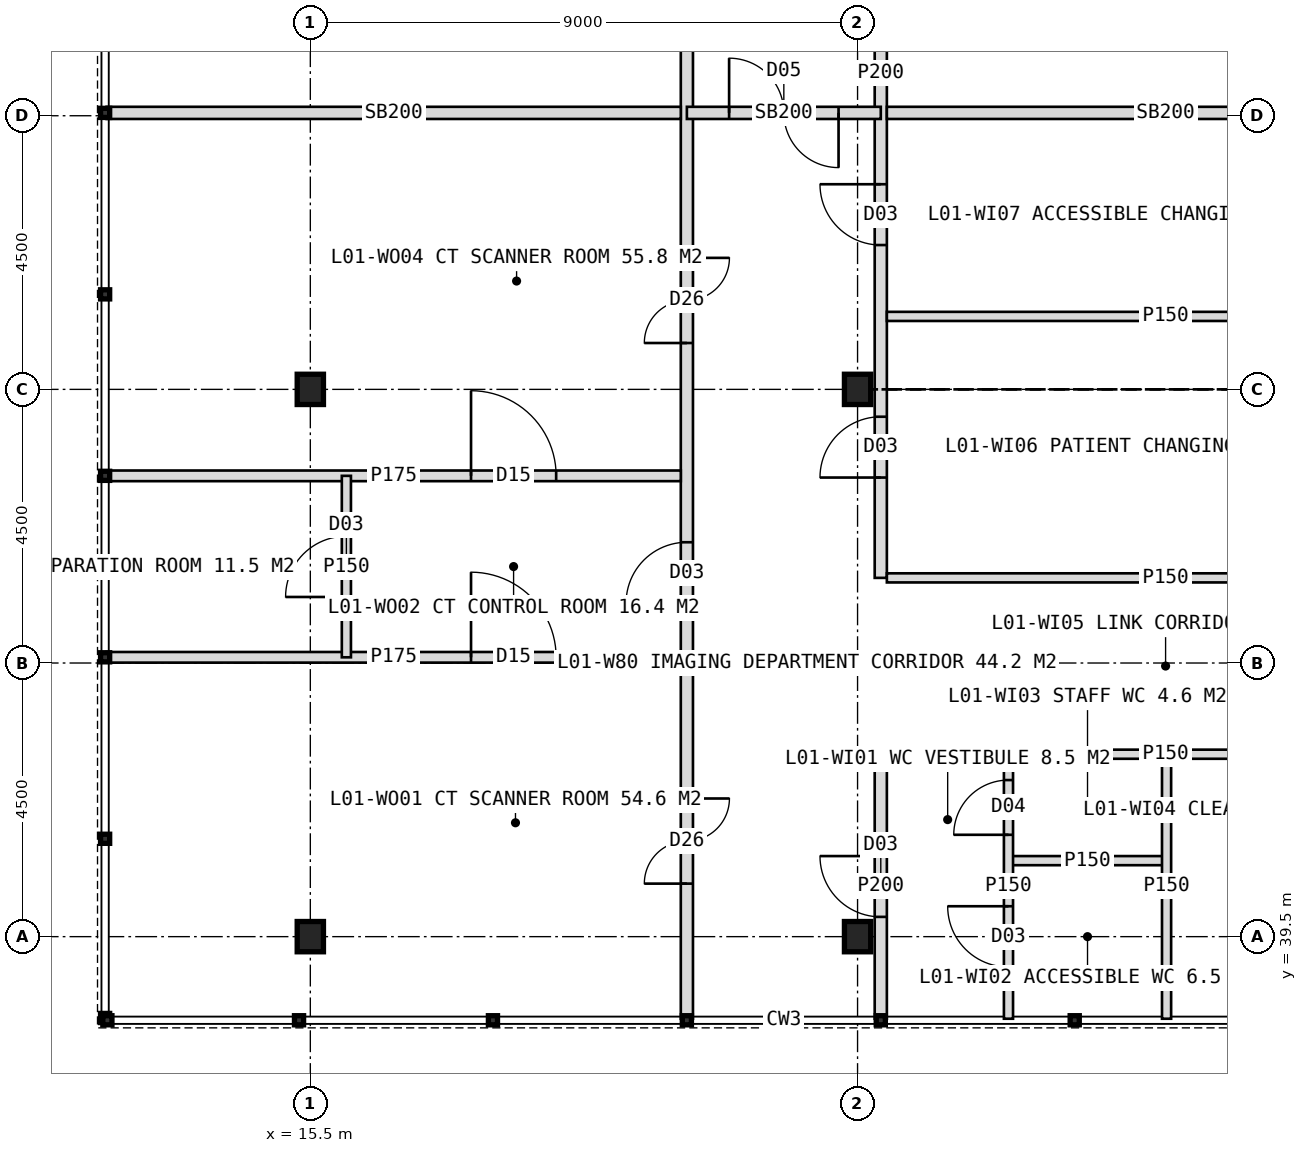
"""IFC4 building model, lengths in metres.
Left out: names, types, materials, properties, quantities, classifications, styles, units other than length and angle.
Written with IfcOpenShell. Run it as: python <this file> out.ifc"""

import sys

from ifc_helpers import new_model, si_unit, direction, frame, frame_2d, origin, origin_2d, place, context, subcontext, project, spatial, rectangle, i_section, extrude, element, fill, save


model = new_model("IFC4")
c1 = context("Model", 3, precision=1e-05, world=origin(), true_north=direction((0.0, 1.0)))
c2 = subcontext(c1, "Body", "Model", "MODEL_VIEW")
j1 = project(units=[si_unit("LENGTHUNIT", "METRE"), si_unit("PLANEANGLEUNIT", "RADIAN")], contexts=[c1])
p1 = place(None, origin())
s1 = spatial("IfcSite", under=j1, at=p1, CompositionType="ELEMENT")
p2 = place(p1, origin())
s2 = spatial("IfcBuilding", under=s1, at=p2, CompositionType="ELEMENT")
p3 = place(p2, frame((0.0, 0.0, 6.0)))
s3 = spatial("IfcBuildingStorey", under=s2, at=p3, CompositionType="ELEMENT", Elevation=6.0)
for number, where, z_axis, x_axis in (
    (1, (15.5, 39.5, 0.0), (0.0, 0.0, 1.0), (1.0, 0.0, 0.0)),
    (2, (15.5, 48.5, 0.0), (0.0, 0.0, 1.0), (1.0, 0.0, 0.0)),
    (3, (24.5, 39.5, 0.0), (0.0, 0.0, 1.0), (1.0, 0.0, 0.0)),
    (4, (24.5, 48.5, 0.0), (0.0, 0.0, 1.0), (1.0, 0.0, 0.0)),
):
    element("IfcColumn", number, at=place(p3, frame(where, z_axis=z_axis, x_axis=x_axis)), inside=s3, PredefinedType="COLUMN", context=c2, shape_type="SweptSolid", body=[
        extrude(i_section(OverallWidth=0.432, OverallDepth=0.498, WebThickness=0.056, FlangeThickness=0.089, FilletRadius=0.015, at=origin_2d()), origin(), (0.0, 0.0, 1.0), 5.0),
    ])
p4 = place(p3, frame((21.693, 38.15, 0.0), z_axis=(0.0, 0.0, 1.0), x_axis=(0.0, 1.0, 0.0)))
e5 = element("IfcWall", 5, at=p4, inside=s3, PredefinedType="PARTITIONING", context=c2, shape_type="SweptSolid", body=[
    extrude(rectangle(XDim=47.7, YDim=0.2, at=frame_2d((23.85, 0.0))), origin(), (0.0, 0.0, 1.0), 4.7),
])
p5 = place(p4, frame((45.7, 0.0, 0.0)))
e6 = element("IfcOpeningElement", 6, at=p5, cuts=e5, PredefinedType="OPENING", context=c2, shape_type="SweptSolid", body=[
    extrude(rectangle(XDim=1.2, YDim=2.1, at=frame_2d((0.6, 1.05))), frame((0.0, 0.11, 0.0), z_axis=(0.0, -1.0, 0.0), x_axis=(1.0, 0.0, 0.0)), (0.0, 0.0, 1.0), 0.22),
])
p6 = place(p4, frame((36.244, 0.0, 0.0)))
e7 = element("IfcOpeningElement", 7, at=p6, cuts=e5, PredefinedType="OPENING", context=c2, shape_type="SweptSolid", body=[
    extrude(rectangle(XDim=1.0, YDim=2.1, at=frame_2d((0.5, 1.05))), frame((0.0, 0.11, 0.0), z_axis=(0.0, -1.0, 0.0), x_axis=(1.0, 0.0, 0.0)), (0.0, 0.0, 1.0), 0.22),
])
p7 = place(p4, frame((2.222, 0.0, 0.0)))
e8 = element("IfcOpeningElement", 8, at=p7, cuts=e5, PredefinedType="OPENING", context=c2, shape_type="SweptSolid", body=[
    extrude(rectangle(XDim=1.4, YDim=2.2, at=frame_2d((0.7, 1.1))), frame((0.0, 0.11, 0.0), z_axis=(0.0, -1.0, 0.0), x_axis=(1.0, 0.0, 0.0)), (0.0, 0.0, 1.0), 0.22),
])
p8 = place(p4, frame((6.836, 0.0, 0.0)))
e9 = element("IfcOpeningElement", 9, at=p8, cuts=e5, PredefinedType="OPENING", context=c2, shape_type="SweptSolid", body=[
    extrude(rectangle(XDim=1.0, YDim=2.1, at=frame_2d((0.5, 1.05))), frame((0.0, 0.11, 0.0), z_axis=(0.0, -1.0, 0.0), x_axis=(1.0, 0.0, 0.0)), (0.0, 0.0, 1.0), 0.22),
])
p9 = place(p4, frame((11.113, 0.0, 0.0)))
e10 = element("IfcOpeningElement", 10, at=p9, cuts=e5, PredefinedType="OPENING", context=c2, shape_type="SweptSolid", body=[
    extrude(rectangle(XDim=1.4, YDim=2.2, at=frame_2d((0.7, 1.1))), frame((0.0, 0.11, 0.0), z_axis=(0.0, -1.0, 0.0), x_axis=(1.0, 0.0, 0.0)), (0.0, 0.0, 1.0), 0.22),
])
p10 = place(p4, frame((21.558, 0.0, 0.0)))
e11 = element("IfcOpeningElement", 11, at=p10, cuts=e5, PredefinedType="OPENING", context=c2, shape_type="SweptSolid", body=[
    extrude(rectangle(XDim=1.4, YDim=2.2, at=frame_2d((0.7, 1.1))), frame((0.0, 0.11, 0.0), z_axis=(0.0, -1.0, 0.0), x_axis=(1.0, 0.0, 0.0)), (0.0, 0.0, 1.0), 0.22),
])
p11 = place(p4, frame((24.742, 0.0, 0.0)))
e12 = element("IfcOpeningElement", 12, at=p11, cuts=e5, PredefinedType="OPENING", context=c2, shape_type="SweptSolid", body=[
    extrude(rectangle(XDim=1.0, YDim=2.1, at=frame_2d((0.5, 1.05))), frame((0.0, 0.11, 0.0), z_axis=(0.0, -1.0, 0.0), x_axis=(1.0, 0.0, 0.0)), (0.0, 0.0, 1.0), 0.22),
])
p12 = place(p4, frame((29.019, 0.0, 0.0)))
e13 = element("IfcOpeningElement", 13, at=p12, cuts=e5, PredefinedType="OPENING", context=c2, shape_type="SweptSolid", body=[
    extrude(rectangle(XDim=1.4, YDim=2.2, at=frame_2d((0.7, 1.1))), frame((0.0, 0.11, 0.0), z_axis=(0.0, -1.0, 0.0), x_axis=(1.0, 0.0, 0.0)), (0.0, 0.0, 1.0), 0.22),
])
p13 = place(p4, frame((33.695, 0.0, 0.0)))
e14 = element("IfcOpeningElement", 14, at=p13, cuts=e5, PredefinedType="OPENING", context=c2, shape_type="SweptSolid", body=[
    extrude(rectangle(XDim=1.0, YDim=2.1, at=frame_2d((0.5, 1.05))), frame((0.0, 0.11, 0.0), z_axis=(0.0, -1.0, 0.0), x_axis=(1.0, 0.0, 0.0)), (0.0, 0.0, 1.0), 0.22),
])
p14 = place(p3, frame((24.882, 38.15, 0.0), z_axis=(0.0, 0.0, 1.0), x_axis=(0.0, 1.0, 0.0)))
e15 = element("IfcWall", 15, at=p14, inside=s3, PredefinedType="PARTITIONING", context=c2, shape_type="SweptSolid", body=[
    extrude(rectangle(XDim=4.35, YDim=0.2, at=frame_2d((2.175, 0.0))), origin(), (0.0, 0.0, 1.0), 4.7),
])
p15 = place(p14, frame((1.675, 0.0, 0.0)))
e16 = element("IfcOpeningElement", 16, at=p15, cuts=e15, PredefinedType="OPENING", context=c2, shape_type="SweptSolid", body=[
    extrude(rectangle(XDim=1.0, YDim=2.1, at=frame_2d((0.5, 1.05))), frame((0.0, 0.11, 0.0), z_axis=(0.0, -1.0, 0.0), x_axis=(1.0, 0.0, 0.0)), (0.0, 0.0, 1.0), 0.22),
])
p16 = place(p3, frame((24.882, 45.4, 0.0), z_axis=(0.0, 0.0, 1.0), x_axis=(0.0, 1.0, 0.0)))
e17 = element("IfcWall", 17, at=p16, inside=s3, PredefinedType="PARTITIONING", context=c2, shape_type="SweptSolid", body=[
    extrude(rectangle(XDim=16.6, YDim=0.2, at=frame_2d((8.3, 0.0))), origin(), (0.0, 0.0, 1.0), 4.7),
])
p17 = place(p16, frame((1.65, 0.0, 0.0)))
e18 = element("IfcOpeningElement", 18, at=p17, cuts=e17, PredefinedType="OPENING", context=c2, shape_type="SweptSolid", body=[
    extrude(rectangle(XDim=1.0, YDim=2.1, at=frame_2d((0.5, 1.05))), frame((0.0, 0.11, 0.0), z_axis=(0.0, -1.0, 0.0), x_axis=(1.0, 0.0, 0.0)), (0.0, 0.0, 1.0), 0.22),
])
p18 = place(p16, frame((5.473, 0.0, 0.0)))
e19 = element("IfcOpeningElement", 19, at=p18, cuts=e17, PredefinedType="OPENING", context=c2, shape_type="SweptSolid", body=[
    extrude(rectangle(XDim=1.0, YDim=2.1, at=frame_2d((0.5, 1.05))), frame((0.0, 0.11, 0.0), z_axis=(0.0, -1.0, 0.0), x_axis=(1.0, 0.0, 0.0)), (0.0, 0.0, 1.0), 0.22),
])
p19 = place(p16, frame((9.174, 0.0, 0.0)))
e20 = element("IfcOpeningElement", 20, at=p19, cuts=e17, PredefinedType="OPENING", context=c2, shape_type="SweptSolid", body=[
    extrude(rectangle(XDim=1.4, YDim=2.2, at=frame_2d((0.7, 1.1))), frame((0.0, 0.11, 0.0), z_axis=(0.0, -1.0, 0.0), x_axis=(1.0, 0.0, 0.0)), (0.0, 0.0, 1.0), 0.22),
])
p20 = place(p16, frame((13.65, 0.0, 0.0)))
e21 = element("IfcOpeningElement", 21, at=p20, cuts=e17, PredefinedType="OPENING", context=c2, shape_type="SweptSolid", body=[
    extrude(rectangle(XDim=1.4, YDim=2.2, at=frame_2d((0.7, 1.1))), frame((0.0, 0.11, 0.0), z_axis=(0.0, -1.0, 0.0), x_axis=(1.0, 0.0, 0.0)), (0.0, 0.0, 1.0), 0.22),
])
p21 = place(p3, frame((21.693, 53.047, 0.0), z_axis=(0.0, 0.0, 1.0), x_axis=(1.0, 0.0, 0.0)))
e22 = element("IfcWall", 22, at=p21, inside=s3, PredefinedType="SOLIDWALL", context=c2, shape_type="SweptSolid", body=[
    extrude(rectangle(XDim=3.189, YDim=0.2, at=frame_2d((1.594, 0.0))), origin(), (0.0, 0.0, 1.0), 4.7),
])
p22 = place(p21, frame((0.695, 0.0, 0.0)))
e23 = element("IfcOpeningElement", 23, at=p22, cuts=e22, PredefinedType="OPENING", context=c2, shape_type="SweptSolid", body=[
    extrude(rectangle(XDim=1.8, YDim=2.2, at=frame_2d((0.9, 1.1))), frame((0.0, 0.11, 0.0), z_axis=(0.0, -1.0, 0.0), x_axis=(1.0, 0.0, 0.0)), (0.0, 0.0, 1.0), 0.22),
])
p23 = place(p3, frame((12.15, 44.094, 0.0), z_axis=(0.0, 0.0, 1.0), x_axis=(1.0, 0.0, 0.0)))
e24 = element("IfcWall", 24, at=p23, inside=s3, PredefinedType="PARTITIONING", context=c2, shape_type="SweptSolid", body=[
    extrude(rectangle(XDim=9.443, YDim=0.175, at=frame_2d((4.722, 0.0))), origin(), (0.0, 0.0, 1.0), 4.7),
])
p24 = place(p23, frame((5.993, 0.0, 0.0)))
e25 = element("IfcOpeningElement", 25, at=p24, cuts=e24, PredefinedType="OPENING", context=c2, shape_type="SweptSolid", body=[
    extrude(rectangle(XDim=1.4, YDim=2.1, at=frame_2d((0.7, 1.05))), frame((0.0, 0.097, 0.0), z_axis=(0.0, -1.0, 0.0), x_axis=(1.0, 0.0, 0.0)), (0.0, 0.0, 1.0), 0.195),
])
p25 = place(p3, frame((12.15, 47.078, 0.0), z_axis=(0.0, 0.0, 1.0), x_axis=(1.0, 0.0, 0.0)))
e26 = element("IfcWall", 26, at=p25, inside=s3, PredefinedType="PARTITIONING", context=c2, shape_type="SweptSolid", body=[
    extrude(rectangle(XDim=9.443, YDim=0.175, at=frame_2d((4.722, 0.0))), origin(), (0.0, 0.0, 1.0), 4.7),
])
p26 = place(p25, frame((5.993, 0.0, 0.0)))
e27 = element("IfcOpeningElement", 27, at=p26, cuts=e26, PredefinedType="OPENING", context=c2, shape_type="SweptSolid", body=[
    extrude(rectangle(XDim=1.4, YDim=2.1, at=frame_2d((0.7, 1.05))), frame((0.0, 0.097, 0.0), z_axis=(0.0, -1.0, 0.0), x_axis=(1.0, 0.0, 0.0)), (0.0, 0.0, 1.0), 0.195),
])
p27 = place(p3, frame((12.15, 53.047, 0.0), z_axis=(0.0, 0.0, 1.0), x_axis=(1.0, 0.0, 0.0)))
e28 = element("IfcWall", 28, at=p27, inside=s3, PredefinedType="SOLIDWALL", context=c2, shape_type="SweptSolid", body=[
    extrude(rectangle(XDim=9.443, YDim=0.2, at=frame_2d((4.722, 0.0))), origin(), (0.0, 0.0, 1.0), 4.7),
])
p28 = place(p3, frame((16.093, 44.094, 0.0), z_axis=(0.0, 0.0, 1.0), x_axis=(0.0, 1.0, 0.0)))
e29 = element("IfcWall", 29, at=p28, inside=s3, PredefinedType="PARTITIONING", context=c2, shape_type="SweptSolid", body=[
    extrude(rectangle(XDim=2.984, YDim=0.15, at=frame_2d((1.492, 0.0))), origin(), (0.0, 0.0, 1.0), 4.7),
])
p29 = place(p28, frame((0.992, 0.0, 0.0)))
e30 = element("IfcOpeningElement", 30, at=p29, cuts=e29, PredefinedType="OPENING", context=c2, shape_type="SweptSolid", body=[
    extrude(rectangle(XDim=1.0, YDim=2.1, at=frame_2d((0.5, 1.05))), frame((0.0, 0.085, 0.0), z_axis=(0.0, -1.0, 0.0), x_axis=(1.0, 0.0, 0.0)), (0.0, 0.0, 1.0), 0.17),
])
p30 = place(p3, frame((26.982, 40.75, 0.0), z_axis=(0.0, 0.0, 1.0), x_axis=(1.0, 0.0, 0.0)))
e31 = element("IfcWall", 31, at=p30, inside=s3, PredefinedType="PARTITIONING", context=c2, shape_type="SweptSolid", body=[
    extrude(rectangle(XDim=2.6, YDim=0.15, at=frame_2d((1.3, 0.0))), origin(), (0.0, 0.0, 1.0), 4.7),
])
p31 = place(p3, frame((24.982, 42.5, 0.0), z_axis=(0.0, 0.0, 1.0), x_axis=(1.0, 0.0, 0.0)))
e32 = element("IfcWall", 32, at=p31, inside=s3, PredefinedType="PARTITIONING", context=c2, shape_type="SweptSolid", body=[
    extrude(rectangle(XDim=9.168, YDim=0.15, at=frame_2d((4.584, 0.0))), origin(), (0.0, 0.0, 1.0), 4.7),
])
p32 = place(p31, frame((6.434, 0.0, 0.0)))
e33 = element("IfcOpeningElement", 33, at=p32, cuts=e32, PredefinedType="OPENING", context=c2, shape_type="SweptSolid", body=[
    extrude(rectangle(XDim=0.9, YDim=2.1, at=frame_2d((0.45, 1.05))), frame((0.0, 0.085, 0.0), z_axis=(0.0, -1.0, 0.0), x_axis=(1.0, 0.0, 0.0)), (0.0, 0.0, 1.0), 0.17),
])
for number, where, z_axis, x_axis in (
    (34, (24.982, 45.4, 0.0), (0.0, 0.0, 1.0), (1.0, 0.0, 0.0)),
    (35, (24.982, 49.7, 0.0), (0.0, 0.0, 1.0), (1.0, 0.0, 0.0)),
):
    element("IfcWall", number, at=place(p3, frame(where, z_axis=z_axis, x_axis=x_axis)), inside=s3, PredefinedType="PARTITIONING", context=c2, shape_type="SweptSolid", body=[
        extrude(rectangle(XDim=9.168, YDim=0.15, at=frame_2d((4.584, 0.0))), origin(), (0.0, 0.0, 1.0), 4.7),
    ])
p33 = place(p3, frame((24.982, 53.047, 0.0), z_axis=(0.0, 0.0, 1.0), x_axis=(1.0, 0.0, 0.0)))
e36 = element("IfcWall", 36, at=p33, inside=s3, PredefinedType="SOLIDWALL", context=c2, shape_type="SweptSolid", body=[
    extrude(rectangle(XDim=9.168, YDim=0.2, at=frame_2d((4.584, 0.0))), origin(), (0.0, 0.0, 1.0), 4.7),
])
p34 = place(p3, frame((26.982, 38.15, 0.0), z_axis=(0.0, 0.0, 1.0), x_axis=(0.0, 1.0, 0.0)))
e37 = element("IfcWall", 37, at=p34, inside=s3, PredefinedType="PARTITIONING", context=c2, shape_type="SweptSolid", body=[
    extrude(rectangle(XDim=4.35, YDim=0.15, at=frame_2d((2.175, 0.0))), origin(), (0.0, 0.0, 1.0), 4.7),
])
p35 = place(p34, frame((0.85, 0.0, 0.0)))
e38 = element("IfcOpeningElement", 38, at=p35, cuts=e37, PredefinedType="OPENING", context=c2, shape_type="SweptSolid", body=[
    extrude(rectangle(XDim=1.0, YDim=2.1, at=frame_2d((0.5, 1.05))), frame((0.0, 0.085, 0.0), z_axis=(0.0, -1.0, 0.0), x_axis=(1.0, 0.0, 0.0)), (0.0, 0.0, 1.0), 0.17),
])
p36 = place(p34, frame((3.025, 0.0, 0.0)))
e39 = element("IfcOpeningElement", 39, at=p36, cuts=e37, PredefinedType="OPENING", context=c2, shape_type="SweptSolid", body=[
    extrude(rectangle(XDim=0.9, YDim=2.1, at=frame_2d((0.45, 1.05))), frame((0.0, 0.085, 0.0), z_axis=(0.0, -1.0, 0.0), x_axis=(1.0, 0.0, 0.0)), (0.0, 0.0, 1.0), 0.17),
])
p37 = place(p3, frame((29.582, 38.15, 0.0), z_axis=(0.0, 0.0, 1.0), x_axis=(0.0, 1.0, 0.0)))
e40 = element("IfcWall", 40, at=p37, inside=s3, PredefinedType="PARTITIONING", context=c2, shape_type="SweptSolid", body=[
    extrude(rectangle(XDim=4.35, YDim=0.15, at=frame_2d((2.175, 0.0))), origin(), (0.0, 0.0, 1.0), 4.7),
])
p38 = place(p22, origin())
e41 = element("IfcDoor", 41, at=p38, inside=s3, OperationType="DOUBLE_DOOR_DOUBLE_SWING", PredefinedType="DOOR", context=c2, shape_type="SweptSolid", body=[
    extrude(rectangle(XDim=1.8, YDim=2.2, at=frame_2d((0.9, 1.1))), frame((0.0, 0.025, 0.0), z_axis=(0.0, -1.0, 0.0), x_axis=(1.0, 0.0, 0.0)), (0.0, 0.0, 1.0), 0.05),
])
fill(e23, e41)
p39 = place(p7, origin())
e42 = element("IfcDoor", 42, at=p39, inside=s3, OperationType="DOUBLE_DOOR_SINGLE_SWING", PredefinedType="DOOR", context=c2, shape_type="SweptSolid", body=[
    extrude(rectangle(XDim=1.4, YDim=2.2, at=frame_2d((0.7, 1.1))), frame((0.0, 0.025, 0.0), z_axis=(0.0, -1.0, 0.0), x_axis=(1.0, 0.0, 0.0)), (0.0, 0.0, 1.0), 0.05),
])
fill(e8, e42)
p40 = place(p8, origin())
e43 = element("IfcDoor", 43, at=p40, inside=s3, OperationType="SINGLE_SWING_LEFT", PredefinedType="DOOR", context=c2, shape_type="SweptSolid", body=[
    extrude(rectangle(XDim=1.0, YDim=2.1, at=frame_2d((0.5, 1.05))), frame((0.0, 0.025, 0.0), z_axis=(0.0, -1.0, 0.0), x_axis=(1.0, 0.0, 0.0)), (0.0, 0.0, 1.0), 0.05),
])
fill(e9, e43)
p41 = place(p24, origin())
e44 = element("IfcDoor", 44, at=p41, inside=s3, OperationType="SINGLE_SWING_LEFT", PredefinedType="DOOR", context=c2, shape_type="SweptSolid", body=[
    extrude(rectangle(XDim=1.4, YDim=2.1, at=frame_2d((0.7, 1.05))), frame((0.0, 0.025, 0.0), z_axis=(0.0, -1.0, 0.0), x_axis=(1.0, 0.0, 0.0)), (0.0, 0.0, 1.0), 0.05),
])
fill(e25, e44)
p42 = place(p26, origin())
e45 = element("IfcDoor", 45, at=p42, inside=s3, OperationType="SINGLE_SWING_LEFT", PredefinedType="DOOR", context=c2, shape_type="SweptSolid", body=[
    extrude(rectangle(XDim=1.4, YDim=2.1, at=frame_2d((0.7, 1.05))), frame((0.0, 0.025, 0.0), z_axis=(0.0, -1.0, 0.0), x_axis=(1.0, 0.0, 0.0)), (0.0, 0.0, 1.0), 0.05),
])
fill(e27, e45)
p43 = place(p29, origin())
e46 = element("IfcDoor", 46, at=p43, inside=s3, OperationType="SINGLE_SWING_LEFT", PredefinedType="DOOR", context=c2, shape_type="SweptSolid", body=[
    extrude(rectangle(XDim=1.0, YDim=2.1, at=frame_2d((0.5, 1.05))), frame((0.0, 0.025, 0.0), z_axis=(0.0, -1.0, 0.0), x_axis=(1.0, 0.0, 0.0)), (0.0, 0.0, 1.0), 0.05),
])
fill(e30, e46)
p44 = place(p9, origin())
e47 = element("IfcDoor", 47, at=p44, inside=s3, OperationType="DOUBLE_DOOR_SINGLE_SWING", PredefinedType="DOOR", context=c2, shape_type="SweptSolid", body=[
    extrude(rectangle(XDim=1.4, YDim=2.2, at=frame_2d((0.7, 1.1))), frame((0.0, 0.025, 0.0), z_axis=(0.0, -1.0, 0.0), x_axis=(1.0, 0.0, 0.0)), (0.0, 0.0, 1.0), 0.05),
])
fill(e10, e47)
p45 = place(p15, origin())
e48 = element("IfcDoor", 48, at=p45, inside=s3, OperationType="SINGLE_SWING_RIGHT", PredefinedType="DOOR", context=c2, shape_type="SweptSolid", body=[
    extrude(rectangle(XDim=1.0, YDim=2.1, at=frame_2d((0.5, 1.05))), frame((0.0, 0.025, 0.0), z_axis=(0.0, -1.0, 0.0), x_axis=(1.0, 0.0, 0.0)), (0.0, 0.0, 1.0), 0.05),
])
fill(e16, e48)
p46 = place(p35, origin())
e49 = element("IfcDoor", 49, at=p46, inside=s3, OperationType="SINGLE_SWING_RIGHT", PredefinedType="DOOR", context=c2, shape_type="SweptSolid", body=[
    extrude(rectangle(XDim=1.0, YDim=2.1, at=frame_2d((0.5, 1.05))), frame((0.0, 0.025, 0.0), z_axis=(0.0, -1.0, 0.0), x_axis=(1.0, 0.0, 0.0)), (0.0, 0.0, 1.0), 0.05),
])
fill(e38, e49)
p47 = place(p36, origin())
e50 = element("IfcDoor", 50, at=p47, inside=s3, OperationType="SINGLE_SWING_LEFT", PredefinedType="DOOR", context=c2, shape_type="SweptSolid", body=[
    extrude(rectangle(XDim=0.9, YDim=2.1, at=frame_2d((0.45, 1.05))), frame((0.0, 0.025, 0.0), z_axis=(0.0, -1.0, 0.0), x_axis=(1.0, 0.0, 0.0)), (0.0, 0.0, 1.0), 0.05),
])
fill(e39, e50)
p48 = place(p17, origin())
e51 = element("IfcDoor", 51, at=p48, inside=s3, OperationType="SINGLE_SWING_LEFT", PredefinedType="DOOR", context=c2, shape_type="SweptSolid", body=[
    extrude(rectangle(XDim=1.0, YDim=2.1, at=frame_2d((0.5, 1.05))), frame((0.0, 0.025, 0.0), z_axis=(0.0, -1.0, 0.0), x_axis=(1.0, 0.0, 0.0)), (0.0, 0.0, 1.0), 0.05),
])
fill(e18, e51)
p49 = place(p18, origin())
e52 = element("IfcDoor", 52, at=p49, inside=s3, OperationType="SINGLE_SWING_RIGHT", PredefinedType="DOOR", context=c2, shape_type="SweptSolid", body=[
    extrude(rectangle(XDim=1.0, YDim=2.1, at=frame_2d((0.5, 1.05))), frame((0.0, 0.025, 0.0), z_axis=(0.0, -1.0, 0.0), x_axis=(1.0, 0.0, 0.0)), (0.0, 0.0, 1.0), 0.05),
])
fill(e19, e52)
save(model, sys.argv[1])
